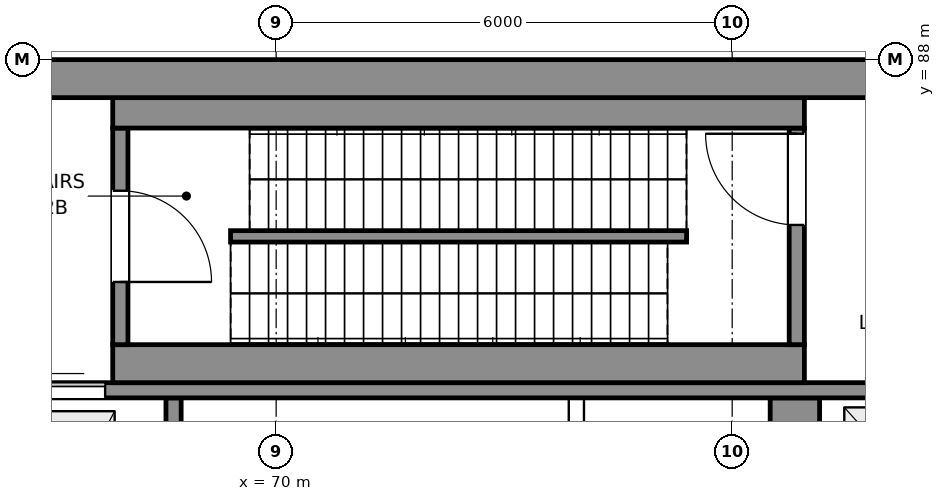
"""IFC4 building model, lengths in metres.
Left out: names, types, materials, properties, quantities, classifications, styles, units other than length and angle.
Written with IfcOpenShell. Run it as: python <this file> out.ifc"""

import sys

from ifc_helpers import new_model, si_unit, direction, frame, frame_2d, origin, place, context, subcontext, project, spatial, rectangle, extrude, element, fill, save


model = new_model("IFC4")
c1 = context("Model", 3, precision=1e-05, world=origin(), true_north=direction((0.0, 1.0)))
c2 = subcontext(c1, "Body", "Model", "MODEL_VIEW")
j1 = project(units=[si_unit("LENGTHUNIT", "METRE"), si_unit("PLANEANGLEUNIT", "RADIAN")], contexts=[c1])
p1 = place(None, origin())
s1 = spatial("IfcSite", under=j1, at=p1, CompositionType="ELEMENT")
p2 = place(p1, origin())
s2 = spatial("IfcBuilding", under=s1, at=p2, CompositionType="ELEMENT")
p3 = place(p2, frame((0.0, 0.0, 342.2)))
s3 = spatial("IfcBuildingStorey", under=s2, at=p3, CompositionType="ELEMENT", Elevation=342.2)
p4 = place(p3, frame((68.65, 81.1, 0.0), z_axis=(0.0, 0.0, 1.0), x_axis=(0.0, 1.0, 0.0)))
e1 = element("IfcWall", 1, at=p4, inside=s3, PredefinedType="SHEAR", context=c2, shape_type="SweptSolid", body=[
    extrude(rectangle(XDim=2.45, YDim=0.2, at=frame_2d((1.225, 0.0))), origin(), (0.0, 0.0, 1.0), 4.5),
])
p5 = place(p3, frame((73.95, 81.1, 0.0), z_axis=(0.0, 0.0, 1.0), x_axis=(0.0, 1.0, 0.0)))
e2 = element("IfcWall", 2, at=p5, inside=s3, PredefinedType="PARTITIONING", context=c2, shape_type="SweptSolid", body=[
    extrude(rectangle(XDim=2.45, YDim=0.2, at=frame_2d((1.225, 0.0))), origin(), (0.0, 0.0, 1.0), 4.2),
])
p6 = place(p3, frame((76.825, 81.3, 0.0), z_axis=(0.0, 0.0, 1.0), x_axis=(0.0, 1.0, 0.0)))
e3 = element("IfcWall", 3, at=p6, inside=s3, PredefinedType="SHEAR", context=c2, shape_type="SweptSolid", body=[
    extrude(rectangle(XDim=2.25, YDim=0.65, at=frame_2d((1.125, 0.0))), origin(), (0.0, 0.0, 1.0), 4.5),
])
p7 = place(p3, frame((59.0, 83.65, 0.0), z_axis=(0.0, 0.0, 1.0), x_axis=(1.0, 0.0, 0.0)))
e4 = element("IfcWall", 4, at=p7, inside=s3, PredefinedType="SHEAR", context=c2, shape_type="SweptSolid", body=[
    extrude(rectangle(XDim=22.0, YDim=0.2, at=frame_2d((11.0, 0.0))), origin(), (0.0, 0.0, 1.0), 4.5),
])
p8 = place(p7, frame((5.125, 0.0, 0.0)))
e5 = element("IfcOpeningElement", 5, at=p8, cuts=e4, PredefinedType="OPENING", context=c2, shape_type="SweptSolid", body=[
    extrude(rectangle(XDim=1.1, YDim=2.1, at=frame_2d((0.55, 1.05))), frame((0.0, 0.11, 0.0), z_axis=(0.0, -1.0, 0.0), x_axis=(1.0, 0.0, 0.0)), (0.0, 0.0, 1.0), 0.22),
])
p9 = place(p7, frame((7.65, 0.0, 0.0)))
e6 = element("IfcOpeningElement", 6, at=p9, cuts=e4, PredefinedType="OPENING", context=c2, shape_type="SweptSolid", body=[
    extrude(rectangle(XDim=1.1, YDim=2.1, at=frame_2d((0.55, 1.05))), frame((0.0, 0.11, 0.0), z_axis=(0.0, -1.0, 0.0), x_axis=(1.0, 0.0, 0.0)), (0.0, 0.0, 1.0), 0.22),
])
p10 = place(p7, frame((18.775, 0.0, 0.0)))
e7 = element("IfcOpeningElement", 7, at=p10, cuts=e4, PredefinedType="OPENING", context=c2, shape_type="SweptSolid", body=[
    extrude(rectangle(XDim=1.2, YDim=2.1, at=frame_2d((0.6, 1.05))), frame((0.0, 0.11, 0.0), z_axis=(0.0, -1.0, 0.0), x_axis=(1.0, 0.0, 0.0)), (0.0, 0.0, 1.0), 0.22),
])
p11 = place(p7, frame((2.075, 0.0, 0.0)))
e8 = element("IfcOpeningElement", 8, at=p11, cuts=e4, PredefinedType="OPENING", context=c2, shape_type="SweptSolid", body=[
    extrude(rectangle(XDim=1.1, YDim=2.1, at=frame_2d((0.55, 1.05))), frame((0.0, 0.11, 0.0), z_axis=(0.0, -1.0, 0.0), x_axis=(1.0, 0.0, 0.0)), (0.0, 0.0, 1.0), 0.22),
])
p12 = place(p3, frame((67.85, 84.0, 0.0), z_axis=(0.0, 0.0, 1.0), x_axis=(1.0, 0.0, 0.0)))
e9 = element("IfcWall", 9, at=p12, inside=s3, PredefinedType="SHEAR", context=c2, shape_type="SweptSolid", body=[
    extrude(rectangle(XDim=9.1, YDim=0.5, at=frame_2d((4.55, 0.0))), origin(), (0.0, 0.0, 1.0), 4.5),
])
p13 = place(p3, frame((67.95, 84.25, 0.0), z_axis=(0.0, 0.0, 1.0), x_axis=(0.0, 1.0, 0.0)))
e10 = element("IfcWall", 10, at=p13, inside=s3, PredefinedType="SHEAR", context=c2, shape_type="SweptSolid", body=[
    extrude(rectangle(XDim=2.85, YDim=0.2, at=frame_2d((1.425, 0.0))), origin(), (0.0, 0.0, 1.0), 4.5),
])
p14 = place(p13, frame((0.825, 0.0, 0.0)))
e11 = element("IfcOpeningElement", 11, at=p14, cuts=e10, PredefinedType="OPENING", context=c2, shape_type="SweptSolid", body=[
    extrude(rectangle(XDim=1.2, YDim=2.1, at=frame_2d((0.6, 1.05))), frame((0.0, 0.11, 0.0), z_axis=(0.0, -1.0, 0.0), x_axis=(1.0, 0.0, 0.0)), (0.0, 0.0, 1.0), 0.22),
])
p15 = place(p3, frame((76.85, 84.25, 0.0), z_axis=(0.0, 0.0, 1.0), x_axis=(0.0, 1.0, 0.0)))
e12 = element("IfcWall", 12, at=p15, inside=s3, PredefinedType="SHEAR", context=c2, shape_type="SweptSolid", body=[
    extrude(rectangle(XDim=2.85, YDim=0.2, at=frame_2d((1.425, 0.0))), origin(), (0.0, 0.0, 1.0), 4.5),
])
p16 = place(p15, frame((1.575, 0.0, 0.0)))
e13 = element("IfcOpeningElement", 13, at=p16, cuts=e12, PredefinedType="OPENING", context=c2, shape_type="SweptSolid", body=[
    extrude(rectangle(XDim=1.2, YDim=2.1, at=frame_2d((0.6, 1.05))), frame((0.0, 0.11, 0.0), z_axis=(0.0, -1.0, 0.0), x_axis=(1.0, 0.0, 0.0)), (0.0, 0.0, 1.0), 0.22),
])
p17 = place(p3, frame((67.85, 87.3, 0.0), z_axis=(0.0, 0.0, 1.0), x_axis=(1.0, 0.0, 0.0)))
e14 = element("IfcWall", 14, at=p17, inside=s3, PredefinedType="SHEAR", context=c2, shape_type="SweptSolid", body=[
    extrude(rectangle(XDim=9.1, YDim=0.4, at=frame_2d((4.55, 0.0))), origin(), (0.0, 0.0, 1.0), 4.5),
])
p18 = place(p3, frame((59.0, 87.75, 0.0), z_axis=(0.0, 0.0, 1.0), x_axis=(1.0, 0.0, 0.0)))
e15 = element("IfcWall", 15, at=p18, inside=s3, PredefinedType="SHEAR", context=c2, shape_type="SweptSolid", body=[
    extrude(rectangle(XDim=22.0, YDim=0.5, at=frame_2d((11.0, 0.0))), origin(), (0.0, 0.0, 1.0), 4.5),
])
p19 = place(p3, frame((69.4, 85.675, 0.0), z_axis=(0.0, 0.0, 1.0), x_axis=(1.0, 0.0, 0.0)))
e16 = element("IfcWall", 16, at=p19, inside=s3, PredefinedType="SHEAR", context=c2, shape_type="SweptSolid", body=[
    extrude(rectangle(XDim=6.0, YDim=0.15, at=frame_2d((3.0, 0.0))), origin(), (0.0, 0.0, 1.0), 4.5),
])
p20 = place(p14, frame((1.2, 0.0, 0.0), z_axis=(0.0, 0.0, 1.0), x_axis=(-1.0, 0.0, 0.0)))
e17 = element("IfcDoor", 17, at=p20, inside=s3, OperationType="SINGLE_SWING_RIGHT", PredefinedType="DOOR", context=c2, shape_type="SweptSolid", body=[
    extrude(rectangle(XDim=1.2, YDim=2.1, at=frame_2d((0.6, 1.05))), frame((0.0, 0.025, 0.0), z_axis=(0.0, -1.0, 0.0), x_axis=(1.0, 0.0, 0.0)), (0.0, 0.0, 1.0), 0.05),
])
fill(e11, e17)
p21 = place(p16, origin())
e18 = element("IfcDoor", 18, at=p21, inside=s3, OperationType="SINGLE_SWING_RIGHT", PredefinedType="DOOR", context=c2, shape_type="SweptSolid", body=[
    extrude(rectangle(XDim=1.2, YDim=2.1, at=frame_2d((0.6, 1.05))), frame((0.0, 0.025, 0.0), z_axis=(0.0, -1.0, 0.0), x_axis=(1.0, 0.0, 0.0)), (0.0, 0.0, 1.0), 0.05),
])
fill(e13, e18)
p22 = place(p9, origin())
e19 = element("IfcDoor", 19, at=p22, inside=s3, OperationType="DOUBLE_DOOR_SLIDING", PredefinedType="DOOR", context=c2, shape_type="SweptSolid", body=[
    extrude(rectangle(XDim=1.1, YDim=2.1, at=frame_2d((0.55, 1.05))), frame((0.0, 0.025, 0.0), z_axis=(0.0, -1.0, 0.0), x_axis=(1.0, 0.0, 0.0)), (0.0, 0.0, 1.0), 0.05),
])
fill(e6, e19)
save(model, sys.argv[1])
